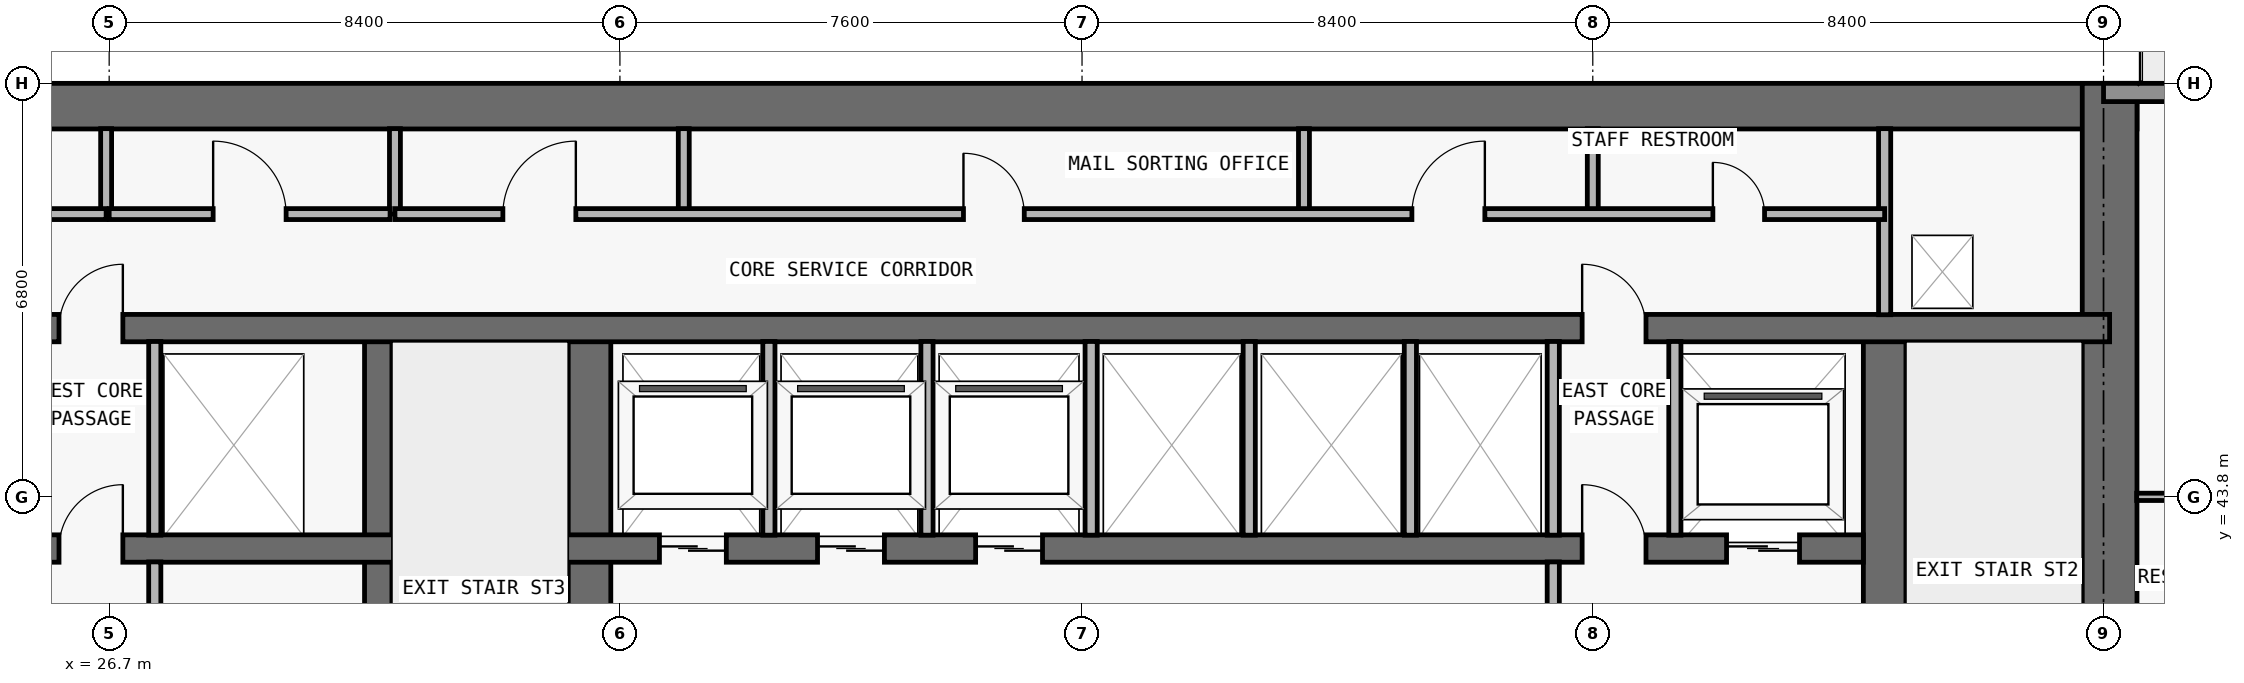
"""IFC4 building model, lengths in metres.
Left out: names, types, materials, properties, quantities, classifications, styles, units other than length and angle.
Written with IfcOpenShell. Run it as: python <this file> out.ifc"""

import sys

from ifc_helpers import new_model, si_unit, direction, frame, frame_2d, origin, place, context, subcontext, project, spatial, rectangle, extrude, element, fill, save


model = new_model("IFC4")
c1 = context("Model", 3, precision=1e-05, world=origin(), true_north=direction((0.0, 1.0)))
c2 = subcontext(c1, "Body", "Model", "MODEL_VIEW")
j1 = project(units=[si_unit("LENGTHUNIT", "METRE"), si_unit("PLANEANGLEUNIT", "RADIAN")], contexts=[c1])
p1 = place(None, origin())
s1 = spatial("IfcSite", under=j1, at=p1, CompositionType="ELEMENT")
p2 = place(p1, origin())
s2 = spatial("IfcBuilding", under=s1, at=p2, CompositionType="ELEMENT")
p3 = place(p2, frame((0.0, 0.0, 43.2)))
s3 = spatial("IfcBuildingStorey", under=s2, at=p3, CompositionType="ELEMENT", Elevation=43.2)
p4 = place(p3, frame((17.75, 50.225, 0.0), z_axis=(0.0, 0.0, 1.0), x_axis=(1.0, 0.0, 0.0)))
e1 = element("IfcWall", 1, at=p4, inside=s3, PredefinedType="SHEAR", context=c2, shape_type="SweptSolid", body=[
    extrude(rectangle(XDim=42.3, YDim=0.75, at=frame_2d((21.15, 0.0))), origin(), (0.0, 0.0, 1.0), 3.05),
])
p5 = place(p3, frame((59.6, 36.45, 0.0), z_axis=(0.0, 0.0, 1.0), x_axis=(0.0, 1.0, 0.0)))
e2 = element("IfcWall", 2, at=p5, inside=s3, PredefinedType="SHEAR", context=c2, shape_type="SweptSolid", body=[
    extrude(rectangle(XDim=14.15, YDim=0.9, at=frame_2d((7.075, 0.0))), origin(), (0.0, 0.0, 1.0), 3.05),
])
p6 = place(p3, frame((55.9, 36.9, 0.0), z_axis=(0.0, 0.0, 1.0), x_axis=(0.0, 1.0, 0.0)))
e3 = element("IfcWall", 3, at=p6, inside=s3, PredefinedType="SHEAR", context=c2, shape_type="SweptSolid", body=[
    extrude(rectangle(XDim=9.675, YDim=0.7, at=frame_2d((4.837, 0.0))), origin(), (0.0, 0.0, 1.0), 3.05),
])
p7 = place(p6, frame((0.65, 0.0, 0.0)))
e4 = element("IfcOpeningElement", 4, at=p7, cuts=e3, PredefinedType="OPENING", context=c2, shape_type="SweptSolid", body=[
    extrude(rectangle(XDim=1.1, YDim=2.15, at=frame_2d((0.55, 1.075))), frame((0.0, 0.36, 0.0), z_axis=(0.0, -1.0, 0.0), x_axis=(1.0, 0.0, 0.0)), (0.0, 0.0, 1.0), 0.72),
])
p8 = place(p3, frame((31.125, 36.9, 0.0), z_axis=(0.0, 0.0, 1.0), x_axis=(0.0, 1.0, 0.0)))
e5 = element("IfcWall", 5, at=p8, inside=s3, PredefinedType="SHEAR", context=c2, shape_type="SweptSolid", body=[
    extrude(rectangle(XDim=9.675, YDim=0.45, at=frame_2d((4.837, 0.0))), origin(), (0.0, 0.0, 1.0), 3.05),
])
p9 = place(p3, frame((34.6, 36.9, 0.0), z_axis=(0.0, 0.0, 1.0), x_axis=(0.0, 1.0, 0.0)))
e6 = element("IfcWall", 6, at=p9, inside=s3, PredefinedType="SHEAR", context=c2, shape_type="SweptSolid", body=[
    extrude(rectangle(XDim=9.675, YDim=0.7, at=frame_2d((4.837, 0.0))), origin(), (0.0, 0.0, 1.0), 3.05),
])
p10 = place(p3, frame((22.25, 42.95, 0.0), z_axis=(0.0, 0.0, 1.0), x_axis=(1.0, 0.0, 0.0)))
e7 = element("IfcWall", 7, at=p10, inside=s3, PredefinedType="SHEAR", context=c2, shape_type="SweptSolid", body=[
    extrude(rectangle(XDim=33.3, YDim=0.45, at=frame_2d((16.65, 0.0))), origin(), (0.0, 0.0, 1.0), 3.05),
])
p11 = place(p10, frame((1.05, 0.0, 0.0)))
e8 = element("IfcOpeningElement", 8, at=p11, cuts=e7, PredefinedType="OPENING", context=c2, shape_type="SweptSolid", body=[
    extrude(rectangle(XDim=1.2, YDim=2.2, at=frame_2d((0.6, 1.1))), frame((0.0, 0.235, 0.0), z_axis=(0.0, -1.0, 0.0), x_axis=(1.0, 0.0, 0.0)), (0.0, 0.0, 1.0), 0.47),
])
p12 = place(p10, frame((31.05, 0.0, 0.0)))
e9 = element("IfcOpeningElement", 9, at=p12, cuts=e7, PredefinedType="OPENING", context=c2, shape_type="SweptSolid", body=[
    extrude(rectangle(XDim=1.2, YDim=2.2, at=frame_2d((0.6, 1.1))), frame((0.0, 0.235, 0.0), z_axis=(0.0, -1.0, 0.0), x_axis=(1.0, 0.0, 0.0)), (0.0, 0.0, 1.0), 0.47),
])
p13 = place(p10, frame((13.5, 0.0, 0.0)))
e10 = element("IfcOpeningElement", 10, at=p13, cuts=e7, PredefinedType="OPENING", context=c2, shape_type="SweptSolid", body=[
    extrude(rectangle(XDim=1.1, YDim=2.2, at=frame_2d((0.55, 1.1))), frame((0.0, 0.235, 0.0), z_axis=(0.0, -1.0, 0.0), x_axis=(1.0, 0.0, 0.0)), (0.0, 0.0, 1.0), 0.47),
])
p14 = place(p10, frame((16.1, 0.0, 0.0)))
e11 = element("IfcOpeningElement", 11, at=p14, cuts=e7, PredefinedType="OPENING", context=c2, shape_type="SweptSolid", body=[
    extrude(rectangle(XDim=1.1, YDim=2.2, at=frame_2d((0.55, 1.1))), frame((0.0, 0.235, 0.0), z_axis=(0.0, -1.0, 0.0), x_axis=(1.0, 0.0, 0.0)), (0.0, 0.0, 1.0), 0.47),
])
p15 = place(p10, frame((18.7, 0.0, 0.0)))
e12 = element("IfcOpeningElement", 12, at=p15, cuts=e7, PredefinedType="OPENING", context=c2, shape_type="SweptSolid", body=[
    extrude(rectangle(XDim=1.1, YDim=2.2, at=frame_2d((0.55, 1.1))), frame((0.0, 0.235, 0.0), z_axis=(0.0, -1.0, 0.0), x_axis=(1.0, 0.0, 0.0)), (0.0, 0.0, 1.0), 0.47),
])
p16 = place(p10, frame((3.625, 0.0, 0.0)))
e13 = element("IfcOpeningElement", 13, at=p16, cuts=e7, PredefinedType="OPENING", context=c2, shape_type="SweptSolid", body=[
    extrude(rectangle(XDim=1.05, YDim=2.15, at=frame_2d((0.525, 1.075))), frame((0.0, 0.235, 0.0), z_axis=(0.0, -1.0, 0.0), x_axis=(1.0, 0.0, 0.0)), (0.0, 0.0, 1.0), 0.47),
])
p17 = place(p10, frame((28.675, 0.0, 0.0)))
e14 = element("IfcOpeningElement", 14, at=p17, cuts=e7, PredefinedType="OPENING", context=c2, shape_type="SweptSolid", body=[
    extrude(rectangle(XDim=1.05, YDim=2.15, at=frame_2d((0.525, 1.075))), frame((0.0, 0.235, 0.0), z_axis=(0.0, -1.0, 0.0), x_axis=(1.0, 0.0, 0.0)), (0.0, 0.0, 1.0), 0.47),
])
p18 = place(p3, frame((18.2, 46.575, 0.0), z_axis=(0.0, 0.0, 1.0), x_axis=(1.0, 0.0, 0.0)))
e15 = element("IfcWall", 15, at=p18, inside=s3, PredefinedType="SHEAR", context=c2, shape_type="SweptSolid", body=[
    extrude(rectangle(XDim=41.4, YDim=0.45, at=frame_2d((20.7, 0.0))), origin(), (0.0, 0.0, 1.0), 3.05),
])
p19 = place(p18, frame((7.675, 0.0, 0.0)))
e16 = element("IfcOpeningElement", 16, at=p19, cuts=e15, PredefinedType="OPENING", context=c2, shape_type="SweptSolid", body=[
    extrude(rectangle(XDim=1.05, YDim=2.15, at=frame_2d((0.525, 1.075))), frame((0.0, 0.235, 0.0), z_axis=(0.0, -1.0, 0.0), x_axis=(1.0, 0.0, 0.0)), (0.0, 0.0, 1.0), 0.47),
])
p20 = place(p18, frame((32.725, 0.0, 0.0)))
e17 = element("IfcOpeningElement", 17, at=p20, cuts=e15, PredefinedType="OPENING", context=c2, shape_type="SweptSolid", body=[
    extrude(rectangle(XDim=1.05, YDim=2.15, at=frame_2d((0.525, 1.075))), frame((0.0, 0.235, 0.0), z_axis=(0.0, -1.0, 0.0), x_axis=(1.0, 0.0, 0.0)), (0.0, 0.0, 1.0), 0.47),
])
p21 = place(p3, frame((59.5, 50.45, 0.0), z_axis=(0.0, 0.0, 1.0), x_axis=(1.0, 0.0, 0.0)))
e18 = element("IfcWall", 18, at=p21, inside=s3, PredefinedType="STANDARD", context=c2, shape_type="SweptSolid", body=[
    extrude(rectangle(XDim=13.2, YDim=0.3, at=frame_2d((6.6, 0.0))), origin(), (0.0, 0.0, 1.0), 3.05),
])
p22 = place(p21, frame((5.6, 0.0, 0.0)))
e19 = element("IfcOpeningElement", 19, at=p22, cuts=e18, PredefinedType="OPENING", context=c2, shape_type="SweptSolid", body=[
    extrude(rectangle(XDim=2.0, YDim=2.3, at=frame_2d((1.0, 1.15))), frame((0.0, 0.16, 0.0), z_axis=(0.0, -1.0, 0.0), x_axis=(1.0, 0.0, 0.0)), (0.0, 0.0, 1.0), 0.32),
])
p23 = place(p3, frame((26.65, 48.45, 0.0), z_axis=(0.0, 0.0, 1.0), x_axis=(0.0, 1.0, 0.0)))
e20 = element("IfcWall", 20, at=p23, inside=s3, PredefinedType="PARTITIONING", context=c2, shape_type="SweptSolid", body=[
    extrude(rectangle(XDim=1.405, YDim=0.18, at=frame_2d((0.703, 0.0))), origin(), (0.0, 0.0, 1.0), 3.05),
])
p24 = place(p3, frame((27.45, 37.345, 0.0), z_axis=(0.0, 0.0, 1.0), x_axis=(0.0, 1.0, 0.0)))
e21 = element("IfcWall", 21, at=p24, inside=s3, PredefinedType="PARTITIONING", context=c2, shape_type="SweptSolid", body=[
    extrude(rectangle(XDim=5.385, YDim=0.2, at=frame_2d((2.692, 0.0))), origin(), (0.0, 0.0, 1.0), 3.05),
])
p25 = place(p3, frame((27.45, 43.17, 0.0), z_axis=(0.0, 0.0, 1.0), x_axis=(0.0, 1.0, 0.0)))
e22 = element("IfcWall", 22, at=p25, inside=s3, PredefinedType="PARTITIONING", context=c2, shape_type="SweptSolid", body=[
    extrude(rectangle(XDim=3.185, YDim=0.2, at=frame_2d((1.593, 0.0))), origin(), (0.0, 0.0, 1.0), 3.05),
])
for number, where, z_axis, x_axis in (
    (23, (31.4, 48.45, 0.0), (0.0, 0.0, 1.0), (0.0, 1.0, 0.0)),
    (24, (36.15, 48.45, 0.0), (0.0, 0.0, 1.0), (0.0, 1.0, 0.0)),
):
    element("IfcWall", number, at=place(p3, frame(where, z_axis=z_axis, x_axis=x_axis)), inside=s3, PredefinedType="PARTITIONING", context=c2, shape_type="SweptSolid", body=[
        extrude(rectangle(XDim=1.405, YDim=0.18, at=frame_2d((0.703, 0.0))), origin(), (0.0, 0.0, 1.0), 3.05),
    ])
for number, where, z_axis, x_axis in (
    (25, (37.55, 43.17, 0.0), (0.0, 0.0, 1.0), (0.0, 1.0, 0.0)),
    (26, (40.15, 43.17, 0.0), (0.0, 0.0, 1.0), (0.0, 1.0, 0.0)),
    (27, (42.85, 43.17, 0.0), (0.0, 0.0, 1.0), (0.0, 1.0, 0.0)),
    (28, (45.45, 43.17, 0.0), (0.0, 0.0, 1.0), (0.0, 1.0, 0.0)),
):
    element("IfcWall", number, at=place(p3, frame(where, z_axis=z_axis, x_axis=x_axis)), inside=s3, PredefinedType="PARTITIONING", context=c2, shape_type="SweptSolid", body=[
        extrude(rectangle(XDim=3.185, YDim=0.2, at=frame_2d((1.593, 0.0))), origin(), (0.0, 0.0, 1.0), 3.05),
    ])
p26 = place(p3, frame((46.35, 48.45, 0.0), z_axis=(0.0, 0.0, 1.0), x_axis=(0.0, 1.0, 0.0)))
e29 = element("IfcWall", 29, at=p26, inside=s3, PredefinedType="PARTITIONING", context=c2, shape_type="SweptSolid", body=[
    extrude(rectangle(XDim=1.405, YDim=0.18, at=frame_2d((0.703, 0.0))), origin(), (0.0, 0.0, 1.0), 3.05),
])
p27 = place(p3, frame((48.1, 43.17, 0.0), z_axis=(0.0, 0.0, 1.0), x_axis=(0.0, 1.0, 0.0)))
e30 = element("IfcWall", 30, at=p27, inside=s3, PredefinedType="PARTITIONING", context=c2, shape_type="SweptSolid", body=[
    extrude(rectangle(XDim=3.185, YDim=0.2, at=frame_2d((1.593, 0.0))), origin(), (0.0, 0.0, 1.0), 3.05),
])
p28 = place(p3, frame((50.45, 37.345, 0.0), z_axis=(0.0, 0.0, 1.0), x_axis=(0.0, 1.0, 0.0)))
e31 = element("IfcWall", 31, at=p28, inside=s3, PredefinedType="PARTITIONING", context=c2, shape_type="SweptSolid", body=[
    extrude(rectangle(XDim=5.385, YDim=0.2, at=frame_2d((2.692, 0.0))), origin(), (0.0, 0.0, 1.0), 3.05),
])
p29 = place(p3, frame((50.45, 43.17, 0.0), z_axis=(0.0, 0.0, 1.0), x_axis=(0.0, 1.0, 0.0)))
e32 = element("IfcWall", 32, at=p29, inside=s3, PredefinedType="PARTITIONING", context=c2, shape_type="SweptSolid", body=[
    extrude(rectangle(XDim=3.185, YDim=0.2, at=frame_2d((1.593, 0.0))), origin(), (0.0, 0.0, 1.0), 3.05),
])
p30 = place(p3, frame((51.1, 48.45, 0.0), z_axis=(0.0, 0.0, 1.0), x_axis=(0.0, 1.0, 0.0)))
e33 = element("IfcWall", 33, at=p30, inside=s3, PredefinedType="PARTITIONING", context=c2, shape_type="SweptSolid", body=[
    extrude(rectangle(XDim=1.405, YDim=0.18, at=frame_2d((0.703, 0.0))), origin(), (0.0, 0.0, 1.0), 3.05),
])
p31 = place(p3, frame((52.45, 43.17, 0.0), z_axis=(0.0, 0.0, 1.0), x_axis=(0.0, 1.0, 0.0)))
e34 = element("IfcWall", 34, at=p31, inside=s3, PredefinedType="PARTITIONING", context=c2, shape_type="SweptSolid", body=[
    extrude(rectangle(XDim=3.185, YDim=0.2, at=frame_2d((1.593, 0.0))), origin(), (0.0, 0.0, 1.0), 3.05),
])
p32 = place(p3, frame((55.9, 46.795, 0.0), z_axis=(0.0, 0.0, 1.0), x_axis=(0.0, 1.0, 0.0)))
e35 = element("IfcWall", 35, at=p32, inside=s3, PredefinedType="PARTITIONING", context=c2, shape_type="SweptSolid", body=[
    extrude(rectangle(XDim=3.06, YDim=0.2, at=frame_2d((1.53, 0.0))), origin(), (0.0, 0.0, 1.0), 3.05),
])
p33 = place(p3, frame((60.045, 43.8, 0.0), z_axis=(0.0, 0.0, 1.0), x_axis=(1.0, 0.0, 0.0)))
e36 = element("IfcWall", 36, at=p33, inside=s3, PredefinedType="PARTITIONING", context=c2, shape_type="SweptSolid", body=[
    extrude(rectangle(XDim=15.96, YDim=0.12, at=frame_2d((7.98, 0.0))), origin(), (0.0, 0.0, 1.0), 2.339),
])
p34 = place(p33, frame((9.805, 0.0, 0.0)))
e37 = element("IfcOpeningElement", 37, at=p34, cuts=e36, PredefinedType="OPENING", context=c2, shape_type="SweptSolid", body=[
    extrude(rectangle(XDim=0.9, YDim=2.15, at=frame_2d((0.45, 1.075))), frame((0.0, 0.07, 0.0), z_axis=(0.0, -1.0, 0.0), x_axis=(1.0, 0.0, 0.0)), (0.0, 0.0, 1.0), 0.14),
])
p35 = place(p33, frame((4.58, 0.0, 0.0)))
e38 = element("IfcOpeningElement", 38, at=p35, cuts=e36, PredefinedType="OPENING", context=c2, shape_type="SweptSolid", body=[
    extrude(rectangle(XDim=0.9, YDim=2.15, at=frame_2d((0.45, 1.075))), frame((0.0, 0.07, 0.0), z_axis=(0.0, -1.0, 0.0), x_axis=(1.0, 0.0, 0.0)), (0.0, 0.0, 1.0), 0.14),
])
p36 = place(p33, frame((0.677, 0.0, 0.0)))
e39 = element("IfcOpeningElement", 39, at=p36, cuts=e36, PredefinedType="OPENING", context=c2, shape_type="SweptSolid", body=[
    extrude(rectangle(XDim=0.85, YDim=2.1, at=frame_2d((0.425, 1.05))), frame((0.0, 0.07, 0.0), z_axis=(0.0, -1.0, 0.0), x_axis=(1.0, 0.0, 0.0)), (0.0, 0.0, 1.0), 0.14),
])
p37 = place(p3, frame((21.9, 48.45, 0.0), z_axis=(0.0, 0.0, 1.0), x_axis=(1.0, 0.0, 0.0)))
e40 = element("IfcWall", 40, at=p37, inside=s3, PredefinedType="PARTITIONING", context=c2, shape_type="SweptSolid", body=[
    extrude(rectangle(XDim=4.75, YDim=0.18, at=frame_2d((2.375, 0.0))), origin(), (0.0, 0.0, 1.0), 3.05),
])
p38 = place(p37, frame((1.775, 0.0, 0.0)))
e41 = element("IfcOpeningElement", 41, at=p38, cuts=e40, PredefinedType="OPENING", context=c2, shape_type="SweptSolid", body=[
    extrude(rectangle(XDim=1.2, YDim=2.2, at=frame_2d((0.6, 1.1))), frame((0.0, 0.1, 0.0), z_axis=(0.0, -1.0, 0.0), x_axis=(1.0, 0.0, 0.0)), (0.0, 0.0, 1.0), 0.2),
])
p39 = place(p3, frame((26.7, 48.45, 0.0), z_axis=(0.0, 0.0, 1.0), x_axis=(1.0, 0.0, 0.0)))
e42 = element("IfcWall", 42, at=p39, inside=s3, PredefinedType="PARTITIONING", context=c2, shape_type="SweptSolid", body=[
    extrude(rectangle(XDim=4.62, YDim=0.18, at=frame_2d((2.31, 0.0))), origin(), (0.0, 0.0, 1.0), 3.05),
])
p40 = place(p39, frame((1.71, 0.0, 0.0)))
e43 = element("IfcOpeningElement", 43, at=p40, cuts=e42, PredefinedType="OPENING", context=c2, shape_type="SweptSolid", body=[
    extrude(rectangle(XDim=1.2, YDim=2.2, at=frame_2d((0.6, 1.1))), frame((0.0, 0.1, 0.0), z_axis=(0.0, -1.0, 0.0), x_axis=(1.0, 0.0, 0.0)), (0.0, 0.0, 1.0), 0.2),
])
p41 = place(p3, frame((31.4, 48.45, 0.0), z_axis=(0.0, 0.0, 1.0), x_axis=(1.0, 0.0, 0.0)))
e44 = element("IfcWall", 44, at=p41, inside=s3, PredefinedType="PARTITIONING", context=c2, shape_type="SweptSolid", body=[
    extrude(rectangle(XDim=24.5, YDim=0.18, at=frame_2d((12.25, 0.0))), origin(), (0.0, 0.0, 1.0), 3.05),
])
p42 = place(p41, frame((1.775, 0.0, 0.0)))
e45 = element("IfcOpeningElement", 45, at=p42, cuts=e44, PredefinedType="OPENING", context=c2, shape_type="SweptSolid", body=[
    extrude(rectangle(XDim=1.2, YDim=2.2, at=frame_2d((0.6, 1.1))), frame((0.0, 0.1, 0.0), z_axis=(0.0, -1.0, 0.0), x_axis=(1.0, 0.0, 0.0)), (0.0, 0.0, 1.0), 0.2),
])
p43 = place(p41, frame((9.35, 0.0, 0.0)))
e46 = element("IfcOpeningElement", 46, at=p43, cuts=e44, PredefinedType="OPENING", context=c2, shape_type="SweptSolid", body=[
    extrude(rectangle(XDim=1.0, YDim=2.2, at=frame_2d((0.5, 1.1))), frame((0.0, 0.1, 0.0), z_axis=(0.0, -1.0, 0.0), x_axis=(1.0, 0.0, 0.0)), (0.0, 0.0, 1.0), 0.2),
])
p44 = place(p41, frame((16.725, 0.0, 0.0)))
e47 = element("IfcOpeningElement", 47, at=p44, cuts=e44, PredefinedType="OPENING", context=c2, shape_type="SweptSolid", body=[
    extrude(rectangle(XDim=1.2, YDim=2.2, at=frame_2d((0.6, 1.1))), frame((0.0, 0.1, 0.0), z_axis=(0.0, -1.0, 0.0), x_axis=(1.0, 0.0, 0.0)), (0.0, 0.0, 1.0), 0.2),
])
p45 = place(p41, frame((21.675, 0.0, 0.0)))
e48 = element("IfcOpeningElement", 48, at=p45, cuts=e44, PredefinedType="OPENING", context=c2, shape_type="SweptSolid", body=[
    extrude(rectangle(XDim=0.85, YDim=2.1, at=frame_2d((0.425, 1.05))), frame((0.0, 0.1, 0.0), z_axis=(0.0, -1.0, 0.0), x_axis=(1.0, 0.0, 0.0)), (0.0, 0.0, 1.0), 0.2),
])
p46 = place(p12, origin())
e49 = element("IfcDoor", 49, at=p46, inside=s3, OperationType="DOUBLE_DOOR_SLIDING", PredefinedType="DOOR", context=c2, shape_type="SweptSolid", body=[
    extrude(rectangle(XDim=1.2, YDim=2.2, at=frame_2d((0.6, 1.1))), frame((0.0, 0.025, 0.0), z_axis=(0.0, -1.0, 0.0), x_axis=(1.0, 0.0, 0.0)), (0.0, 0.0, 1.0), 0.05),
])
fill(e9, e49)
p47 = place(p13, origin())
e50 = element("IfcDoor", 50, at=p47, inside=s3, OperationType="DOUBLE_DOOR_SLIDING", PredefinedType="DOOR", context=c2, shape_type="SweptSolid", body=[
    extrude(rectangle(XDim=1.1, YDim=2.2, at=frame_2d((0.55, 1.1))), frame((0.0, 0.025, 0.0), z_axis=(0.0, -1.0, 0.0), x_axis=(1.0, 0.0, 0.0)), (0.0, 0.0, 1.0), 0.05),
])
fill(e10, e50)
p48 = place(p14, origin())
e51 = element("IfcDoor", 51, at=p48, inside=s3, OperationType="DOUBLE_DOOR_SLIDING", PredefinedType="DOOR", context=c2, shape_type="SweptSolid", body=[
    extrude(rectangle(XDim=1.1, YDim=2.2, at=frame_2d((0.55, 1.1))), frame((0.0, 0.025, 0.0), z_axis=(0.0, -1.0, 0.0), x_axis=(1.0, 0.0, 0.0)), (0.0, 0.0, 1.0), 0.05),
])
fill(e11, e51)
p49 = place(p15, origin())
e52 = element("IfcDoor", 52, at=p49, inside=s3, OperationType="DOUBLE_DOOR_SLIDING", PredefinedType="DOOR", context=c2, shape_type="SweptSolid", body=[
    extrude(rectangle(XDim=1.1, YDim=2.2, at=frame_2d((0.55, 1.1))), frame((0.0, 0.025, 0.0), z_axis=(0.0, -1.0, 0.0), x_axis=(1.0, 0.0, 0.0)), (0.0, 0.0, 1.0), 0.05),
])
fill(e12, e52)
p50 = place(p16, origin())
e53 = element("IfcDoor", 53, at=p50, inside=s3, OperationType="SINGLE_SWING_RIGHT", PredefinedType="DOOR", context=c2, shape_type="SweptSolid", body=[
    extrude(rectangle(XDim=1.05, YDim=2.15, at=frame_2d((0.525, 1.075))), frame((0.0, 0.025, 0.0), z_axis=(0.0, -1.0, 0.0), x_axis=(1.0, 0.0, 0.0)), (0.0, 0.0, 1.0), 0.05),
])
fill(e13, e53)
p51 = place(p17, origin())
e54 = element("IfcDoor", 54, at=p51, inside=s3, OperationType="SINGLE_SWING_LEFT", PredefinedType="DOOR", context=c2, shape_type="SweptSolid", body=[
    extrude(rectangle(XDim=1.05, YDim=2.15, at=frame_2d((0.525, 1.075))), frame((0.0, 0.025, 0.0), z_axis=(0.0, -1.0, 0.0), x_axis=(1.0, 0.0, 0.0)), (0.0, 0.0, 1.0), 0.05),
])
fill(e14, e54)
p52 = place(p19, origin())
e55 = element("IfcDoor", 55, at=p52, inside=s3, OperationType="SINGLE_SWING_RIGHT", PredefinedType="DOOR", context=c2, shape_type="SweptSolid", body=[
    extrude(rectangle(XDim=1.05, YDim=2.15, at=frame_2d((0.525, 1.075))), frame((0.0, 0.025, 0.0), z_axis=(0.0, -1.0, 0.0), x_axis=(1.0, 0.0, 0.0)), (0.0, 0.0, 1.0), 0.05),
])
fill(e16, e55)
p53 = place(p20, origin())
e56 = element("IfcDoor", 56, at=p53, inside=s3, OperationType="SINGLE_SWING_LEFT", PredefinedType="DOOR", context=c2, shape_type="SweptSolid", body=[
    extrude(rectangle(XDim=1.05, YDim=2.15, at=frame_2d((0.525, 1.075))), frame((0.0, 0.025, 0.0), z_axis=(0.0, -1.0, 0.0), x_axis=(1.0, 0.0, 0.0)), (0.0, 0.0, 1.0), 0.05),
])
fill(e17, e56)
p54 = place(p40, origin())
e57 = element("IfcDoor", 57, at=p54, inside=s3, OperationType="SINGLE_SWING_LEFT", PredefinedType="DOOR", context=c2, shape_type="SweptSolid", body=[
    extrude(rectangle(XDim=1.2, YDim=2.2, at=frame_2d((0.6, 1.1))), frame((0.0, 0.025, 0.0), z_axis=(0.0, -1.0, 0.0), x_axis=(1.0, 0.0, 0.0)), (0.0, 0.0, 1.0), 0.05),
])
fill(e43, e57)
p55 = place(p42, origin())
e58 = element("IfcDoor", 58, at=p55, inside=s3, OperationType="SINGLE_SWING_RIGHT", PredefinedType="DOOR", context=c2, shape_type="SweptSolid", body=[
    extrude(rectangle(XDim=1.2, YDim=2.2, at=frame_2d((0.6, 1.1))), frame((0.0, 0.025, 0.0), z_axis=(0.0, -1.0, 0.0), x_axis=(1.0, 0.0, 0.0)), (0.0, 0.0, 1.0), 0.05),
])
fill(e45, e58)
p56 = place(p43, origin())
e59 = element("IfcDoor", 59, at=p56, inside=s3, OperationType="SINGLE_SWING_LEFT", PredefinedType="DOOR", context=c2, shape_type="SweptSolid", body=[
    extrude(rectangle(XDim=1.0, YDim=2.2, at=frame_2d((0.5, 1.1))), frame((0.0, 0.025, 0.0), z_axis=(0.0, -1.0, 0.0), x_axis=(1.0, 0.0, 0.0)), (0.0, 0.0, 1.0), 0.05),
])
fill(e46, e59)
p57 = place(p44, origin())
e60 = element("IfcDoor", 60, at=p57, inside=s3, OperationType="SINGLE_SWING_RIGHT", PredefinedType="DOOR", context=c2, shape_type="SweptSolid", body=[
    extrude(rectangle(XDim=1.2, YDim=2.2, at=frame_2d((0.6, 1.1))), frame((0.0, 0.025, 0.0), z_axis=(0.0, -1.0, 0.0), x_axis=(1.0, 0.0, 0.0)), (0.0, 0.0, 1.0), 0.05),
])
fill(e47, e60)
p58 = place(p45, origin())
e61 = element("IfcDoor", 61, at=p58, inside=s3, OperationType="SINGLE_SWING_LEFT", PredefinedType="DOOR", context=c2, shape_type="SweptSolid", body=[
    extrude(rectangle(XDim=0.85, YDim=2.1, at=frame_2d((0.425, 1.05))), frame((0.0, 0.025, 0.0), z_axis=(0.0, -1.0, 0.0), x_axis=(1.0, 0.0, 0.0)), (0.0, 0.0, 1.0), 0.05),
])
fill(e48, e61)
save(model, sys.argv[1])
